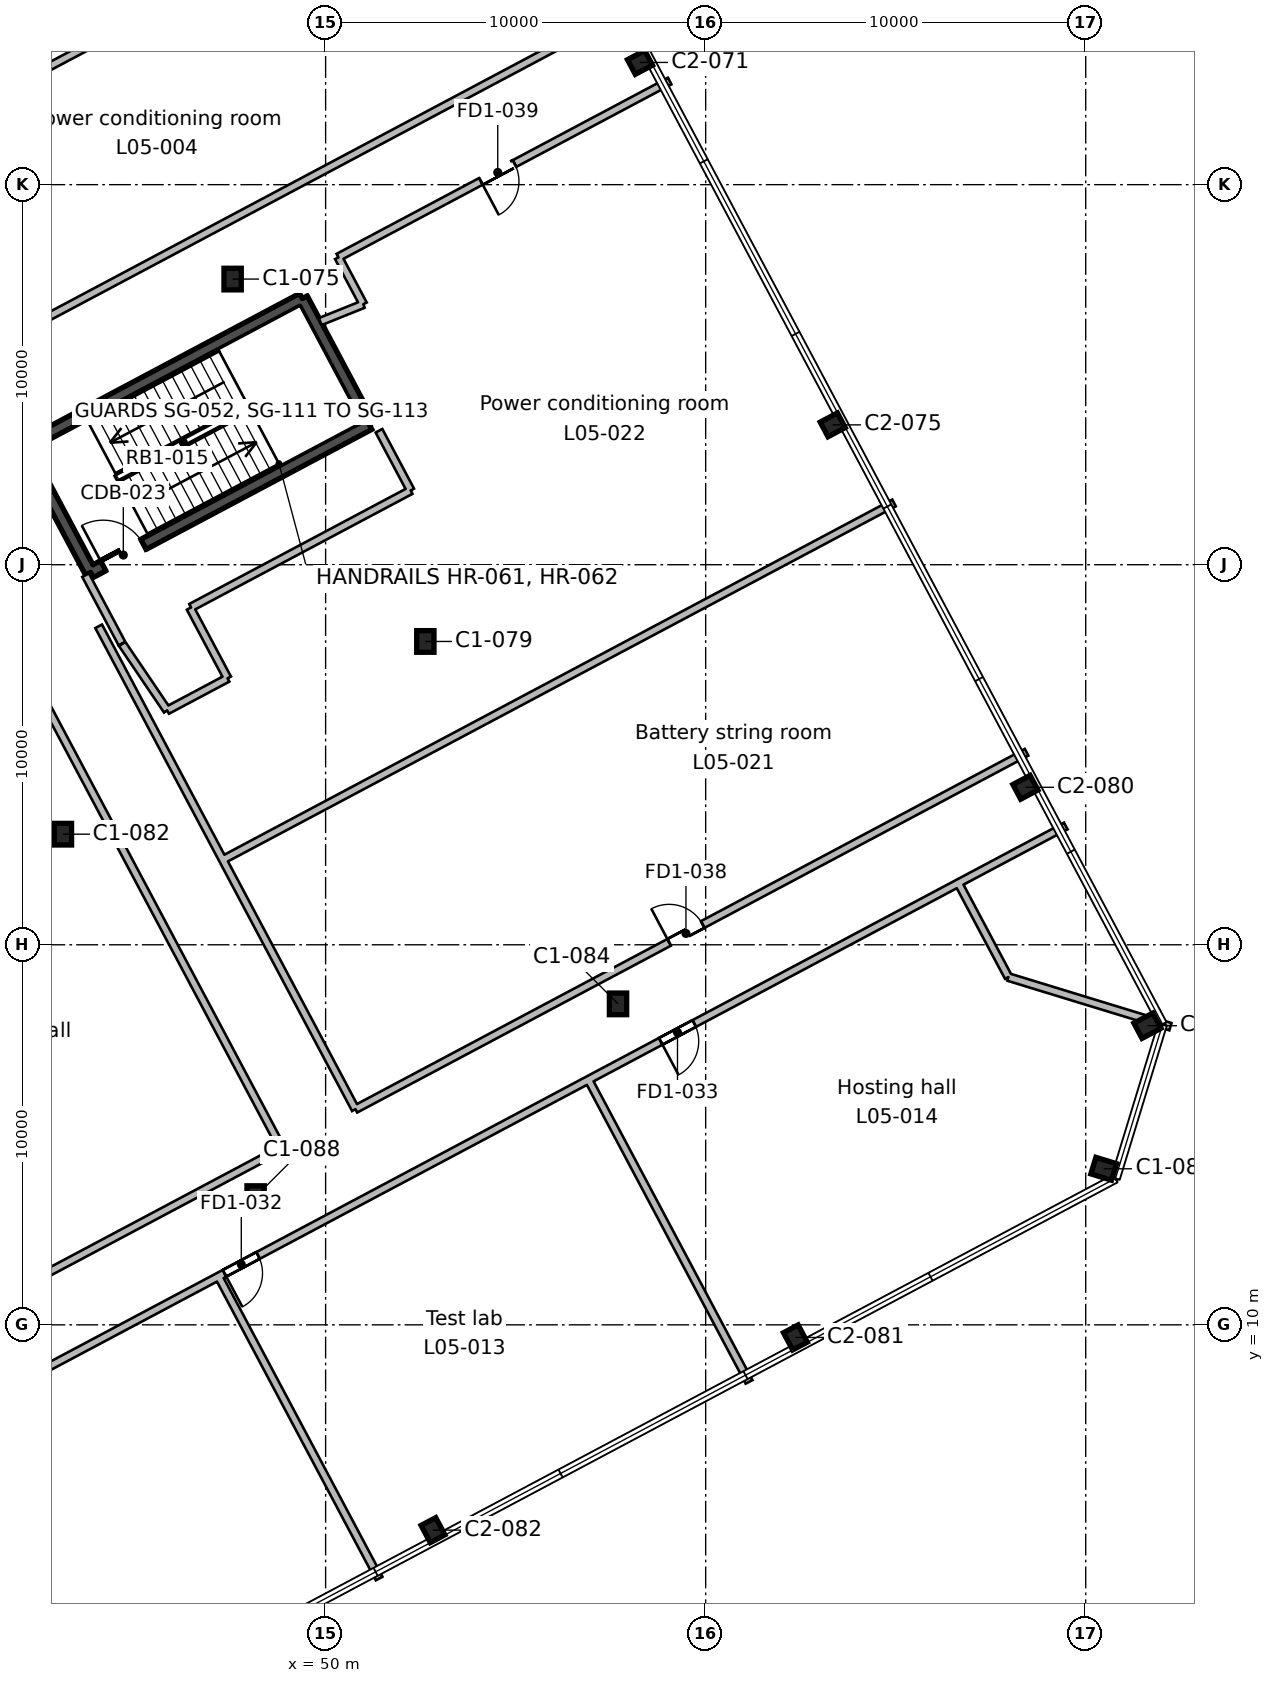
"""IFC4 building model, lengths in metres.
Left out: names, types, materials, properties, quantities, classifications, styles, units other than length and angle.
Written with IfcOpenShell. Run it as: python <this file> out.ifc"""

import sys

from ifc_helpers import new_model, si_unit, direction, frame, frame_2d, origin, origin_2d, place, context, subcontext, project, spatial, rectangle, i_section, extrude, element, fill, save


model = new_model("IFC4")
c1 = context("Model", 3, precision=1e-05, world=origin(), true_north=direction((0.0, 1.0)))
c2 = subcontext(c1, "Body", "Model", "MODEL_VIEW")
j1 = project(units=[si_unit("LENGTHUNIT", "METRE"), si_unit("PLANEANGLEUNIT", "RADIAN")], contexts=[c1])
p1 = place(None, origin())
s1 = spatial("IfcSite", under=j1, at=p1, CompositionType="ELEMENT")
p2 = place(p1, origin())
s2 = spatial("IfcBuilding", under=s1, at=p2, CompositionType="ELEMENT")
p3 = place(p2, frame((0.0, 0.0, 28.4)))
s3 = spatial("IfcBuildingStorey", under=s2, at=p3, CompositionType="ELEMENT", Elevation=28.4)
for number, where, z_axis, x_axis in (
    (1, (52.825, 4.598, 0.0), (0.0, 0.0, 1.0), (0.883, 0.469, 0.0)),
    (2, (62.361, 9.668, 0.0), (0.0, 0.0, 1.0), (0.883, 0.469, 0.0)),
):
    element("IfcColumn", number, at=place(p3, frame(where, z_axis=z_axis, x_axis=x_axis)), inside=s3, PredefinedType="COLUMN", context=c2, shape_type="SweptSolid", body=[
        extrude(i_section(OverallWidth=0.437, OverallDepth=0.513, WebThickness=0.061, FlangeThickness=0.097, FilletRadius=0.015, at=origin_2d()), origin(), (0.0, 0.0, 1.0), 5.4),
    ])
for number, where, z_axis, x_axis in (
    (3, (48.158, 13.374, 0.0), (0.0, 0.0, 1.0), (1.0, 0.0, 0.0)),
    (4, (70.474, 14.106, 0.0), (0.0, 0.0, 1.0), (0.292, 0.956, 0.0)),
    (5, (71.625, 17.871, 0.0), (0.0, 0.0, 1.0), (-0.469, 0.883, 0.0)),
    (6, (57.694, 18.445, 0.0), (0.0, 0.0, 1.0), (1.0, 0.0, 0.0)),
    (7, (43.088, 22.91, 0.0), (0.0, 0.0, 1.0), (1.0, 0.0, 0.0)),
):
    element("IfcColumn", number, at=place(p3, frame(where, z_axis=z_axis, x_axis=x_axis)), inside=s3, PredefinedType="COLUMN", context=c2, shape_type="SweptSolid", body=[
        extrude(i_section(OverallWidth=0.455, OverallDepth=0.569, WebThickness=0.078, FlangeThickness=0.125, FilletRadius=0.015, at=origin_2d()), origin(), (0.0, 0.0, 1.0), 5.4),
    ])
p4 = place(p3, frame((68.413, 24.144, 0.0), z_axis=(0.0, 0.0, 1.0), x_axis=(-0.469471562786, 0.882947592859, 0.0)))
e8 = element("IfcColumn", 8, at=p4, inside=s3, PredefinedType="COLUMN", context=c2, shape_type="SweptSolid", body=[
    extrude(i_section(OverallWidth=0.437, OverallDepth=0.513, WebThickness=0.061, FlangeThickness=0.097, FilletRadius=0.015, at=origin_2d()), origin(), (0.0, 0.0, 1.0), 5.4),
])
p5 = place(p3, frame((52.624, 27.981, 0.0), z_axis=(0.0, 0.0, 1.0), x_axis=(1.0, 0.0, 0.0)))
e9 = element("IfcColumn", 9, at=p5, inside=s3, PredefinedType="COLUMN", context=c2, shape_type="SweptSolid", body=[
    extrude(i_section(OverallWidth=0.455, OverallDepth=0.569, WebThickness=0.078, FlangeThickness=0.125, FilletRadius=0.015, at=origin_2d()), origin(), (0.0, 0.0, 1.0), 5.4),
])
p6 = place(p3, frame((63.343, 33.68, 0.0), z_axis=(0.0, 0.0, 1.0), x_axis=(-0.469471562786, 0.882947592859, 0.0)))
e10 = element("IfcColumn", 10, at=p6, inside=s3, PredefinedType="COLUMN", context=c2, shape_type="SweptSolid", body=[
    extrude(i_section(OverallWidth=0.437, OverallDepth=0.513, WebThickness=0.061, FlangeThickness=0.097, FilletRadius=0.015, at=origin_2d()), origin(), (0.0, 0.0, 1.0), 5.4),
])
p7 = place(p3, frame((47.553, 37.516, 0.0), z_axis=(0.0, 0.0, 1.0), x_axis=(1.0, 0.0, 0.0)))
e11 = element("IfcColumn", 11, at=p7, inside=s3, PredefinedType="COLUMN", context=c2, shape_type="SweptSolid", body=[
    extrude(i_section(OverallWidth=0.455, OverallDepth=0.569, WebThickness=0.078, FlangeThickness=0.125, FilletRadius=0.015, at=origin_2d()), origin(), (0.0, 0.0, 1.0), 5.4),
])
p8 = place(p3, frame((58.272, 43.216, 0.0), z_axis=(0.0, 0.0, 1.0), x_axis=(-0.469471562786, 0.882947592859, 0.0)))
e12 = element("IfcColumn", 12, at=p8, inside=s3, PredefinedType="COLUMN", context=c2, shape_type="SweptSolid", body=[
    extrude(i_section(OverallWidth=0.437, OverallDepth=0.513, WebThickness=0.061, FlangeThickness=0.097, FilletRadius=0.015, at=origin_2d()), origin(), (0.0, 0.0, 1.0), 5.4),
])
p9 = place(p3, frame((49.384, 37.004, 0.0), z_axis=(0.0, 0.0, 1.0), x_axis=(0.46946936446, -0.882948761726, 0.0)))
e13 = element("IfcWall", 13, at=p9, inside=s3, PredefinedType="SHEAR", context=c2, shape_type="SweptSolid", body=[
    extrude(rectangle(XDim=3.75, YDim=0.3, at=frame_2d((1.875, 0.0))), origin(), (0.0, 0.0, 1.0), 5.4),
])
p10 = place(p3, frame((51.145, 33.693, 0.0), z_axis=(0.0, 0.0, 1.0), x_axis=(-0.882945809314, -0.469474917132, 0.0)))
e14 = element("IfcWall", 14, at=p10, inside=s3, PredefinedType="SHEAR", context=c2, shape_type="SweptSolid", body=[
    extrude(rectangle(XDim=8.3, YDim=0.3, at=frame_2d((4.15, 0.0))), origin(), (0.0, 0.0, 1.0), 5.4),
])
p11 = place(p10, frame((6.725, 0.0, 0.0)))
e15 = element("IfcOpeningElement", 15, at=p11, cuts=e14, PredefinedType="OPENING", context=c2, shape_type="SweptSolid", body=[
    extrude(rectangle(XDim=1.2, YDim=2.1, at=frame_2d((0.6, 1.05))), frame((0.0, 0.16, 0.0), z_axis=(0.0, -1.0, 0.0), x_axis=(1.0, 0.0, 0.0)), (0.0, 0.0, 1.0), 0.32),
])
p12 = place(p3, frame((43.816, 29.796, 0.0), z_axis=(0.0, 0.0, 1.0), x_axis=(-0.46946936446, 0.882948761726, 0.0)))
e16 = element("IfcWall", 16, at=p12, inside=s3, PredefinedType="SHEAR", context=c2, shape_type="SweptSolid", body=[
    extrude(rectangle(XDim=3.75, YDim=0.3, at=frame_2d((1.875, 0.0))), origin(), (0.0, 0.0, 1.0), 5.4),
])
p13 = place(p3, frame((42.055, 33.107, 0.0), z_axis=(0.0, 0.0, 1.0), x_axis=(0.882945809314, 0.469474917132, 0.0)))
e17 = element("IfcWall", 17, at=p13, inside=s3, PredefinedType="SHEAR", context=c2, shape_type="SweptSolid", body=[
    extrude(rectangle(XDim=8.3, YDim=0.3, at=frame_2d((4.15, 0.0))), origin(), (0.0, 0.0, 1.0), 5.4),
])
p14 = place(p3, frame((0.0, 13.815, 0.0), z_axis=(0.0, 0.0, 1.0), x_axis=(0.882946053005, 0.469474458819, 0.0)))
e18 = element("IfcWall", 18, at=p14, inside=s3, PredefinedType="PARTITIONING", context=c2, shape_type="SweptSolid", body=[
    extrude(rectangle(XDim=65.714, YDim=0.2, at=frame_2d((32.857, 0.0))), origin(), (0.0, 0.0, 1.0), 4.95),
])
p15 = place(p14, frame((35.65, 0.0, 0.0)))
e19 = element("IfcOpeningElement", 19, at=p15, cuts=e18, PredefinedType="OPENING", context=c2, shape_type="SweptSolid", body=[
    extrude(rectangle(XDim=1.0, YDim=2.1, at=frame_2d((0.5, 1.05))), frame((0.0, 0.11, 0.0), z_axis=(0.0, -1.0, 0.0), x_axis=(1.0, 0.0, 0.0)), (0.0, 0.0, 1.0), 0.22),
])
p16 = place(p14, frame((32.15, 0.0, 0.0)))
e20 = element("IfcOpeningElement", 20, at=p16, cuts=e18, PredefinedType="OPENING", context=c2, shape_type="SweptSolid", body=[
    extrude(rectangle(XDim=1.0, YDim=2.1, at=frame_2d((0.5, 1.05))), frame((0.0, 0.11, 0.0), z_axis=(0.0, -1.0, 0.0), x_axis=(1.0, 0.0, 0.0)), (0.0, 0.0, 1.0), 0.22),
])
p17 = place(p14, frame((19.25, 0.0, 0.0)))
e21 = element("IfcOpeningElement", 21, at=p17, cuts=e18, PredefinedType="OPENING", context=c2, shape_type="SweptSolid", body=[
    extrude(rectangle(XDim=1.0, YDim=2.1, at=frame_2d((0.5, 1.05))), frame((0.0, 0.11, 0.0), z_axis=(0.0, -1.0, 0.0), x_axis=(1.0, 0.0, 0.0)), (0.0, 0.0, 1.0), 0.22),
])
p18 = place(p3, frame((69.475, 23.126, 0.0), z_axis=(0.0, 0.0, 1.0), x_axis=(-0.882944287046, -0.469477780063, 0.0)))
e22 = element("IfcWall", 22, at=p18, inside=s3, PredefinedType="PARTITIONING", context=c2, shape_type="SweptSolid", body=[
    extrude(rectangle(XDim=63.285, YDim=0.2, at=frame_2d((31.643, 0.0))), origin(), (0.0, 0.0, 1.0), 4.95),
])
p19 = place(p18, frame((47.47, 0.0, 0.0)))
e23 = element("IfcOpeningElement", 23, at=p19, cuts=e22, PredefinedType="OPENING", context=c2, shape_type="SweptSolid", body=[
    extrude(rectangle(XDim=1.0, YDim=2.1, at=frame_2d((0.5, 1.05))), frame((0.0, 0.11, 0.0), z_axis=(0.0, -1.0, 0.0), x_axis=(1.0, 0.0, 0.0)), (0.0, 0.0, 1.0), 0.22),
])
p20 = place(p18, frame((31.271, 0.0, 0.0)))
e24 = element("IfcOpeningElement", 24, at=p20, cuts=e22, PredefinedType="OPENING", context=c2, shape_type="SweptSolid", body=[
    extrude(rectangle(XDim=1.0, YDim=2.1, at=frame_2d((0.5, 1.05))), frame((0.0, 0.11, 0.0), z_axis=(0.0, -1.0, 0.0), x_axis=(1.0, 0.0, 0.0)), (0.0, 0.0, 1.0), 0.22),
])
p21 = place(p18, frame((24.07, 0.0, 0.0)))
e25 = element("IfcOpeningElement", 25, at=p21, cuts=e22, PredefinedType="OPENING", context=c2, shape_type="SweptSolid", body=[
    extrude(rectangle(XDim=1.0, YDim=2.1, at=frame_2d((0.5, 1.05))), frame((0.0, 0.11, 0.0), z_axis=(0.0, -1.0, 0.0), x_axis=(1.0, 0.0, 0.0)), (0.0, 0.0, 1.0), 0.22),
])
p22 = place(p18, frame((11.071, 0.0, 0.0)))
e26 = element("IfcOpeningElement", 26, at=p22, cuts=e22, PredefinedType="OPENING", context=c2, shape_type="SweptSolid", body=[
    extrude(rectangle(XDim=1.0, YDim=2.1, at=frame_2d((0.5, 1.05))), frame((0.0, 0.11, 0.0), z_axis=(0.0, -1.0, 0.0), x_axis=(1.0, 0.0, 0.0)), (0.0, 0.0, 1.0), 0.22),
])
p23 = place(p3, frame((29.26, 35.945, 0.0), z_axis=(0.0, 0.0, 1.0), x_axis=(0.882955510648, 0.469456671288, 0.0)))
e27 = element("IfcWall", 27, at=p23, inside=s3, PredefinedType="PARTITIONING", context=c2, shape_type="SweptSolid", body=[
    extrude(rectangle(XDim=29.507, YDim=0.2, at=frame_2d((14.753, 0.0))), origin(), (0.0, 0.0, 1.0), 4.95),
])
p24 = place(p3, frame((47.183, 11.272, 0.0), z_axis=(0.0, 0.0, 1.0), x_axis=(0.469454635748, -0.882956592916, 0.0)))
e28 = element("IfcWall", 28, at=p24, inside=s3, PredefinedType="PARTITIONING", context=c2, shape_type="SweptSolid", body=[
    extrude(rectangle(XDim=9.001, YDim=0.2, at=frame_2d((4.501, 0.0))), origin(), (0.0, 0.0, 1.0), 4.95),
])
p25 = place(p3, frame((44.028, 28.38, 0.0), z_axis=(0.0, 0.0, 1.0), x_axis=(0.469474817112, -0.882945862495, 0.0)))
e29 = element("IfcWall", 29, at=p25, inside=s3, PredefinedType="PARTITIONING", context=c2, shape_type="SweptSolid", body=[
    extrude(rectangle(XDim=14.39, YDim=0.2, at=frame_2d((7.195, 0.0))), origin(), (0.0, 0.0, 1.0), 4.95),
])
p26 = place(p3, frame((50.784, 15.674, 0.0), z_axis=(0.0, 0.0, 1.0), x_axis=(0.882931064856, 0.469502646119, 0.0)))
e30 = element("IfcWall", 30, at=p26, inside=s3, PredefinedType="PARTITIONING", context=c2, shape_type="SweptSolid", body=[
    extrude(rectangle(XDim=20.002, YDim=0.2, at=frame_2d((10.001, 0.0))), origin(), (0.0, 0.0, 1.0), 4.95),
])
p27 = place(p26, frame((9.35, 0.0, 0.0)))
e31 = element("IfcOpeningElement", 31, at=p27, cuts=e30, PredefinedType="OPENING", context=c2, shape_type="SweptSolid", body=[
    extrude(rectangle(XDim=1.0, YDim=2.1, at=frame_2d((0.5, 1.05))), frame((0.0, 0.11, 0.0), z_axis=(0.0, -1.0, 0.0), x_axis=(1.0, 0.0, 0.0)), (0.0, 0.0, 1.0), 0.22),
])
p28 = place(p3, frame((64.956, 31.625, 0.0), z_axis=(0.0, 0.0, 1.0), x_axis=(-0.882962064064, -0.469444345396, 0.0)))
e32 = element("IfcWall", 32, at=p28, inside=s3, PredefinedType="PARTITIONING", context=c2, shape_type="SweptSolid", body=[
    extrude(rectangle(XDim=20.002, YDim=0.2, at=frame_2d((10.001, 0.0))), origin(), (0.0, 0.0, 1.0), 4.95),
])
p29 = place(p3, frame((44.641, 27.925, 0.0), z_axis=(0.0, 0.0, 1.0), x_axis=(-0.469289400299, 0.88304442627, 0.0)))
e33 = element("IfcWall", 33, at=p29, inside=s3, PredefinedType="PARTITIONING", context=c2, shape_type="SweptSolid", body=[
    extrude(rectangle(XDim=2.04, YDim=0.2, at=frame_2d((1.02, 0.0))), origin(), (0.0, 0.0, 1.0), 4.95),
])
p30 = place(p3, frame((46.436, 28.863, 0.0), z_axis=(0.0, 0.0, 1.0), x_axis=(0.469342548312, -0.883016178982, 0.0)))
e34 = element("IfcWall", 34, at=p30, inside=s3, PredefinedType="PARTITIONING", context=c2, shape_type="SweptSolid", body=[
    extrude(rectangle(XDim=2.096, YDim=0.2, at=frame_2d((1.048, 0.0))), origin(), (0.0, 0.0, 1.0), 4.95),
])
p31 = place(p3, frame((47.42, 27.012, 0.0), z_axis=(0.0, 0.0, 1.0), x_axis=(-0.882911879422, -0.469538723829, 0.0)))
e35 = element("IfcWall", 35, at=p31, inside=s3, PredefinedType="PARTITIONING", context=c2, shape_type="SweptSolid", body=[
    extrude(rectangle(XDim=1.8, YDim=0.2, at=frame_2d((0.9, 0.0))), origin(), (0.0, 0.0, 1.0), 4.95),
])
p32 = place(p3, frame((45.831, 26.167, 0.0), z_axis=(0.0, 0.0, 1.0), x_axis=(-0.560924797645, 0.827866759441, 0.0)))
e36 = element("IfcWall", 36, at=p32, inside=s3, PredefinedType="PARTITIONING", context=c2, shape_type="SweptSolid", body=[
    extrude(rectangle(XDim=2.113, YDim=0.2, at=frame_2d((1.056, 0.0))), origin(), (0.0, 0.0, 1.0), 4.95),
])
p33 = place(p3, frame((51.404, 33.525, 0.0), z_axis=(0.0, 0.0, 1.0), x_axis=(0.469078340822, -0.883156560396, 0.0)))
e37 = element("IfcWall", 37, at=p33, inside=s3, PredefinedType="PARTITIONING", context=c2, shape_type="SweptSolid", body=[
    extrude(rectangle(XDim=1.78, YDim=0.2, at=frame_2d((0.89, 0.0))), origin(), (0.0, 0.0, 1.0), 4.95),
])
p34 = place(p3, frame((52.239, 31.953, 0.0), z_axis=(0.0, 0.0, 1.0), x_axis=(-0.882908561856, -0.469544962065, 0.0)))
e38 = element("IfcWall", 38, at=p34, inside=s3, PredefinedType="PARTITIONING", context=c2, shape_type="SweptSolid", body=[
    extrude(rectangle(XDim=6.549, YDim=0.2, at=frame_2d((3.274, 0.0))), origin(), (0.0, 0.0, 1.0), 4.95),
])
p35 = place(p3, frame((49.859, 36.397, 0.0), z_axis=(0.0, 0.0, 1.0), x_axis=(0.927439235731, 0.373973881477, 0.0)))
e39 = element("IfcWall", 39, at=p35, inside=s3, PredefinedType="PARTITIONING", context=c2, shape_type="SweptSolid", body=[
    extrude(rectangle(XDim=1.221, YDim=0.2, at=frame_2d((0.611, 0.0))), origin(), (0.0, 0.0, 1.0), 4.95),
])
p36 = place(p3, frame((50.337, 38.087, 0.0), z_axis=(0.0, 0.0, 1.0), x_axis=(0.469436222784, -0.882966382564, 0.0)))
e40 = element("IfcWall", 40, at=p36, inside=s3, PredefinedType="PARTITIONING", context=c2, shape_type="SweptSolid", body=[
    extrude(rectangle(XDim=1.397, YDim=0.2, at=frame_2d((0.699, 0.0))), origin(), (0.0, 0.0, 1.0), 4.95),
])
p37 = place(p3, frame((50.335, 38.091, 0.0), z_axis=(0.0, 0.0, 1.0), x_axis=(0.882925167554, 0.46951373622, 0.0)))
e41 = element("IfcWall", 41, at=p37, inside=s3, PredefinedType="PARTITIONING", context=c2, shape_type="SweptSolid", body=[
    extrude(rectangle(XDim=9.874, YDim=0.2, at=frame_2d((4.937, 0.0))), origin(), (0.0, 0.0, 1.0), 4.95),
])
p38 = place(p37, frame((4.25, 0.0, 0.0)))
e42 = element("IfcOpeningElement", 42, at=p38, cuts=e41, PredefinedType="OPENING", context=c2, shape_type="SweptSolid", body=[
    extrude(rectangle(XDim=1.0, YDim=2.1, at=frame_2d((0.5, 1.05))), frame((0.0, 0.11, 0.0), z_axis=(0.0, -1.0, 0.0), x_axis=(1.0, 0.0, 0.0)), (0.0, 0.0, 1.0), 0.22),
])
p39 = place(p3, frame((56.916, 16.448, 0.0), z_axis=(0.0, 0.0, 1.0), x_axis=(0.469430813661, -0.882969258347, 0.0)))
e43 = element("IfcWall", 43, at=p39, inside=s3, PredefinedType="PARTITIONING", context=c2, shape_type="SweptSolid", body=[
    extrude(rectangle(XDim=9.002, YDim=0.2, at=frame_2d((4.501, 0.0))), origin(), (0.0, 0.0, 1.0), 4.95),
])
p40 = place(p3, frame((66.649, 21.623, 0.0), z_axis=(0.0, 0.0, 1.0), x_axis=(0.469796507672, -0.882774739885, 0.0)))
e44 = element("IfcWall", 44, at=p40, inside=s3, PredefinedType="PARTITIONING", context=c2, shape_type="SweptSolid", body=[
    extrude(rectangle(XDim=2.802, YDim=0.2, at=frame_2d((1.401, 0.0))), origin(), (0.0, 0.0, 1.0), 4.95),
])
p41 = place(p3, frame((67.965, 19.15, 0.0), z_axis=(0.0, 0.0, 1.0), x_axis=(0.956221844793, -0.292642757539, 0.0)))
e45 = element("IfcWall", 45, at=p41, inside=s3, PredefinedType="PARTITIONING", context=c2, shape_type="SweptSolid", body=[
    extrude(rectangle(XDim=4.459, YDim=0.2, at=frame_2d((2.229, 0.0))), origin(), (0.0, 0.0, 1.0), 4.95),
])
p42 = place(p3, frame((39.453, 32.306, 0.0), z_axis=(0.0, 0.0, 1.0), x_axis=(0.469494565876, -0.882935361514, 0.0)))
e46 = element("IfcWall", 46, at=p42, inside=s3, PredefinedType="PARTITIONING", context=c2, shape_type="SweptSolid", body=[
    extrude(rectangle(XDim=20.005, YDim=0.2, at=frame_2d((10.002, 0.0))), origin(), (0.0, 0.0, 1.0), 4.95),
])
p43 = place(p3, frame((48.845, 14.643, 0.0), z_axis=(0.0, 0.0, 1.0), x_axis=(-0.882970325556, -0.469428806304, 0.0)))
e47 = element("IfcWall", 47, at=p43, inside=s3, PredefinedType="PARTITIONING", context=c2, shape_type="SweptSolid", body=[
    extrude(rectangle(XDim=10.004, YDim=0.2, at=frame_2d((5.002, 0.0))), origin(), (0.0, 0.0, 1.0), 4.95),
])
p44 = place(p11, frame((1.2, 0.0, 0.0), z_axis=(0.0, 0.0, 1.0), x_axis=(-1.0, 0.0, 0.0)))
e48 = element("IfcDoor", 48, at=p44, inside=s3, OperationType="SINGLE_SWING_LEFT", PredefinedType="DOOR", context=c2, shape_type="SweptSolid", body=[
    extrude(rectangle(XDim=1.2, YDim=2.1, at=frame_2d((0.6, 1.05))), frame((0.0, 0.025, 0.0), z_axis=(0.0, -1.0, 0.0), x_axis=(1.0, 0.0, 0.0)), (0.0, 0.0, 1.0), 0.05),
])
fill(e15, e48)
p45 = place(p21, origin())
e49 = element("IfcDoor", 49, at=p45, inside=s3, OperationType="SINGLE_SWING_RIGHT", PredefinedType="DOOR", context=c2, shape_type="SweptSolid", body=[
    extrude(rectangle(XDim=1.0, YDim=2.1, at=frame_2d((0.5, 1.05))), frame((0.0, 0.025, 0.0), z_axis=(0.0, -1.0, 0.0), x_axis=(1.0, 0.0, 0.0)), (0.0, 0.0, 1.0), 0.05),
])
fill(e25, e49)
p46 = place(p22, origin())
e50 = element("IfcDoor", 50, at=p46, inside=s3, OperationType="SINGLE_SWING_RIGHT", PredefinedType="DOOR", context=c2, shape_type="SweptSolid", body=[
    extrude(rectangle(XDim=1.0, YDim=2.1, at=frame_2d((0.5, 1.05))), frame((0.0, 0.025, 0.0), z_axis=(0.0, -1.0, 0.0), x_axis=(1.0, 0.0, 0.0)), (0.0, 0.0, 1.0), 0.05),
])
fill(e26, e50)
p47 = place(p27, origin())
e51 = element("IfcDoor", 51, at=p47, inside=s3, OperationType="SINGLE_SWING_LEFT", PredefinedType="DOOR", context=c2, shape_type="SweptSolid", body=[
    extrude(rectangle(XDim=1.0, YDim=2.1, at=frame_2d((0.5, 1.05))), frame((0.0, 0.025, 0.0), z_axis=(0.0, -1.0, 0.0), x_axis=(1.0, 0.0, 0.0)), (0.0, 0.0, 1.0), 0.05),
])
fill(e31, e51)
p48 = place(p38, frame((1.0, 0.0, 0.0), z_axis=(0.0, 0.0, 1.0), x_axis=(-1.0, 0.0, 0.0)))
e52 = element("IfcDoor", 52, at=p48, inside=s3, OperationType="SINGLE_SWING_RIGHT", PredefinedType="DOOR", context=c2, shape_type="SweptSolid", body=[
    extrude(rectangle(XDim=1.0, YDim=2.1, at=frame_2d((0.5, 1.05))), frame((0.0, 0.025, 0.0), z_axis=(0.0, -1.0, 0.0), x_axis=(1.0, 0.0, 0.0)), (0.0, 0.0, 1.0), 0.05),
])
fill(e42, e52)
save(model, sys.argv[1])
